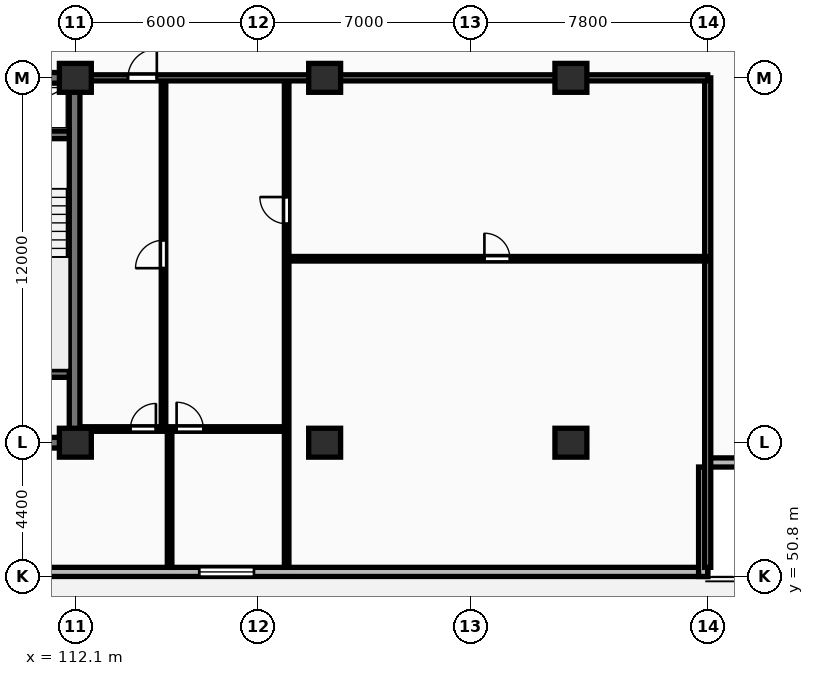
"""IFC4 building model, lengths in metres.
Left out: names, types, materials, properties, quantities, classifications, styles, units other than length and angle.
Written with IfcOpenShell. Run it as: python <this file> out.ifc"""

import sys

from ifc_helpers import new_model, si_unit, direction, frame, frame_2d, origin, origin_2d, place, context, subcontext, project, spatial, rectangle, extrude, element, fill, save


model = new_model("IFC4")
c1 = context("Model", 3, precision=1e-05, world=origin(), true_north=direction((0.0, 1.0)))
c2 = subcontext(c1, "Body", "Model", "MODEL_VIEW")
j1 = project(units=[si_unit("LENGTHUNIT", "METRE"), si_unit("PLANEANGLEUNIT", "RADIAN")], contexts=[c1])
p1 = place(None, origin())
s1 = spatial("IfcSite", under=j1, at=p1, CompositionType="ELEMENT")
p2 = place(p1, origin())
s2 = spatial("IfcBuilding", under=s1, at=p2, CompositionType="ELEMENT")
p3 = place(p2, frame((0.0, 0.0, 24.0)))
s3 = spatial("IfcBuildingStorey", under=s2, at=p3, CompositionType="ELEMENT", Elevation=24.0)
for number, where, z_axis, x_axis in (
    (1, (112.1, 55.2, 0.0), (0.0, 0.0, 1.0), (1.0, 0.0, 0.0)),
    (2, (112.1, 67.2, 0.0), (0.0, 0.0, 1.0), (1.0, 0.0, 0.0)),
    (3, (120.3, 55.2, 0.0), (0.0, 0.0, 1.0), (1.0, 0.0, 0.0)),
    (4, (120.3, 67.2, 0.0), (0.0, 0.0, 1.0), (1.0, 0.0, 0.0)),
    (5, (128.4, 55.2, 0.0), (0.0, 0.0, 1.0), (1.0, 0.0, 0.0)),
    (6, (128.4, 67.2, 0.0), (0.0, 0.0, 1.0), (1.0, 0.0, 0.0)),
):
    element("IfcColumn", number, at=place(p3, frame(where, z_axis=z_axis, x_axis=x_axis)), inside=s3, PredefinedType="COLUMN", context=c2, shape_type="SweptSolid", body=[
        extrude(rectangle(XDim=1.05, YDim=0.95, at=origin_2d()), origin(), (0.0, 0.0, 1.0), 3.25),
    ])
p4 = place(p3, frame((55.3, 50.95, 0.0), z_axis=(0.0, 0.0, 1.0), x_axis=(1.0, 0.0, 0.0)))
e7 = element("IfcWall", 7, at=p4, inside=s3, PredefinedType="STANDARD", context=c2, shape_type="SweptSolid", body=[
    extrude(rectangle(XDim=77.6, YDim=0.3, at=frame_2d((38.8, 0.0))), origin(), (0.0, 0.0, 1.0), 2.97),
])
p5 = place(p4, frame((17.525, 0.0, 0.85)))
e8 = element("IfcOpeningElement", 8, at=p5, cuts=e7, PredefinedType="OPENING", context=c2, shape_type="SweptSolid", body=[
    extrude(rectangle(XDim=1.8, YDim=1.8, at=frame_2d((0.9, 0.9))), frame((0.0, 0.16, 0.0), z_axis=(0.0, -1.0, 0.0), x_axis=(1.0, 0.0, 0.0)), (0.0, 0.0, 1.0), 0.32),
])
p6 = place(p4, frame((60.875, 0.0, 0.85)))
e9 = element("IfcOpeningElement", 9, at=p6, cuts=e7, PredefinedType="OPENING", context=c2, shape_type="SweptSolid", body=[
    extrude(rectangle(XDim=1.8, YDim=1.8, at=frame_2d((0.9, 0.9))), frame((0.0, 0.16, 0.0), z_axis=(0.0, -1.0, 0.0), x_axis=(1.0, 0.0, 0.0)), (0.0, 0.0, 1.0), 0.32),
])
p7 = place(p4, frame((9.9, 0.0, 0.0)))
e10 = element("IfcOpeningElement", 10, at=p7, cuts=e7, PredefinedType="OPENING", context=c2, shape_type="SweptSolid", body=[
    extrude(rectangle(XDim=1.6, YDim=2.2, at=frame_2d((0.8, 1.1))), frame((0.0, 0.16, 0.0), z_axis=(0.0, -1.0, 0.0), x_axis=(1.0, 0.0, 0.0)), (0.0, 0.0, 1.0), 0.32),
])
p8 = place(p3, frame((132.75, 50.8, 0.0), z_axis=(0.0, 0.0, 1.0), x_axis=(0.0, 1.0, 0.0)))
e11 = element("IfcWall", 11, at=p8, inside=s3, PredefinedType="STANDARD", context=c2, shape_type="SweptSolid", body=[
    extrude(rectangle(XDim=3.6, YDim=0.3, at=frame_2d((1.8, 0.0))), origin(), (0.0, 0.0, 1.0), 2.97),
])
p9 = place(p3, frame((132.9, 54.55, 0.0), z_axis=(0.0, 0.0, 1.0), x_axis=(1.0, 0.0, 0.0)))
e12 = element("IfcWall", 12, at=p9, inside=s3, PredefinedType="STANDARD", context=c2, shape_type="SweptSolid", body=[
    extrude(rectangle(XDim=3.6, YDim=0.3, at=frame_2d((1.8, 0.0))), origin(), (0.0, 0.0, 1.0), 2.97),
])
p10 = place(p3, frame((75.95, 55.2, 0.0), z_axis=(0.0, 0.0, 1.0), x_axis=(1.0, 0.0, 0.0)))
e13 = element("IfcWall", 13, at=p10, inside=s3, PredefinedType="SHEAR", context=c2, shape_type="SweptSolid", body=[
    extrude(rectangle(XDim=36.3, YDim=0.35, at=frame_2d((18.15, 0.0))), origin(), (0.0, 0.0, 1.0), 3.25),
])
p11 = place(p3, frame((112.075, 55.375, 0.0), z_axis=(0.0, 0.0, 1.0), x_axis=(0.0, 1.0, 0.0)))
e14 = element("IfcWall", 14, at=p11, inside=s3, PredefinedType="SHEAR", context=c2, shape_type="SweptSolid", body=[
    extrude(rectangle(XDim=11.65, YDim=0.35, at=frame_2d((5.825, 0.0))), origin(), (0.0, 0.0, 1.0), 3.25),
])
p12 = place(p3, frame((75.95, 67.2, 0.0), z_axis=(0.0, 0.0, 1.0), x_axis=(1.0, 0.0, 0.0)))
e15 = element("IfcWall", 15, at=p12, inside=s3, PredefinedType="SHEAR", context=c2, shape_type="SweptSolid", body=[
    extrude(rectangle(XDim=36.3, YDim=0.35, at=frame_2d((18.15, 0.0))), origin(), (0.0, 0.0, 1.0), 3.25),
])
p13 = place(p12, frame((5.25, 0.0, 0.0)))
e16 = element("IfcOpeningElement", 16, at=p13, cuts=e15, PredefinedType="OPENING", context=c2, shape_type="SweptSolid", body=[
    extrude(rectangle(XDim=1.0, YDim=2.15, at=frame_2d((0.5, 1.075))), frame((0.0, 0.185, 0.0), z_axis=(0.0, -1.0, 0.0), x_axis=(1.0, 0.0, 0.0)), (0.0, 0.0, 1.0), 0.37),
])
p14 = place(p12, frame((21.6, 0.0, 0.0)))
e17 = element("IfcOpeningElement", 17, at=p14, cuts=e15, PredefinedType="OPENING", context=c2, shape_type="SweptSolid", body=[
    extrude(rectangle(XDim=1.5, YDim=2.2, at=frame_2d((0.75, 1.1))), frame((0.0, 0.185, 0.0), z_axis=(0.0, -1.0, 0.0), x_axis=(1.0, 0.0, 0.0)), (0.0, 0.0, 1.0), 0.37),
])
p15 = place(p12, frame((30.45, 0.0, 0.0)))
e18 = element("IfcOpeningElement", 18, at=p15, cuts=e15, PredefinedType="OPENING", context=c2, shape_type="SweptSolid", body=[
    extrude(rectangle(XDim=1.0, YDim=2.15, at=frame_2d((0.5, 1.075))), frame((0.0, 0.185, 0.0), z_axis=(0.0, -1.0, 0.0), x_axis=(1.0, 0.0, 0.0)), (0.0, 0.0, 1.0), 0.37),
])
for number, where, z_axis, x_axis in (
    (19, (108.66, 57.475, 0.0), (0.0, 0.0, 1.0), (1.0, 0.0, 0.0)),
    (20, (108.66, 65.325, 0.0), (0.0, 0.0, 1.0), (1.0, 0.0, 0.0)),
):
    element("IfcWall", number, at=place(p3, frame(where, z_axis=z_axis, x_axis=x_axis)), inside=s3, PredefinedType="SHEAR", context=c2, shape_type="SweptSolid", body=[
        extrude(rectangle(XDim=3.24, YDim=0.25, at=frame_2d((1.62, 0.0))), origin(), (0.0, 0.0, 1.0), 3.25),
    ])
p16 = place(p3, frame((132.9, 51.1, 0.0), z_axis=(0.0, 0.0, 1.0), x_axis=(0.0, 1.0, 0.0)))
e21 = element("IfcWall", 21, at=p16, inside=s3, PredefinedType="PARTITIONING", context=c2, shape_type="SweptSolid", body=[
    extrude(rectangle(XDim=16.1, YDim=0.2, at=frame_2d((8.05, 0.0))), origin(), (0.0, 0.0, 1.0), 2.97),
])
p17 = place(p3, frame((119.05, 61.25, 0.0), z_axis=(0.0, 0.0, 1.0), x_axis=(1.0, 0.0, 0.0)))
e22 = element("IfcWall", 22, at=p17, inside=s3, PredefinedType="PARTITIONING", context=c2, shape_type="SweptSolid", body=[
    extrude(rectangle(XDim=13.85, YDim=0.15, at=frame_2d((6.925, 0.0))), origin(), (0.0, 0.0, 1.0), 2.97),
])
p18 = place(p17, frame((6.505, 0.0, 0.0)))
e23 = element("IfcOpeningElement", 23, at=p18, cuts=e22, PredefinedType="OPENING", context=c2, shape_type="SweptSolid", body=[
    extrude(rectangle(XDim=0.84, YDim=2.04, at=frame_2d((0.42, 1.02))), frame((0.0, 0.085, 0.0), z_axis=(0.0, -1.0, 0.0), x_axis=(1.0, 0.0, 0.0)), (0.0, 0.0, 1.0), 0.17),
])
p19 = place(p3, frame((119.05, 51.1, 0.0), z_axis=(0.0, 0.0, 1.0), x_axis=(0.0, 1.0, 0.0)))
e24 = element("IfcWall", 24, at=p19, inside=s3, PredefinedType="PARTITIONING", context=c2, shape_type="SweptSolid", body=[
    extrude(rectangle(XDim=16.05, YDim=0.15, at=frame_2d((8.025, 0.0))), origin(), (0.0, 0.0, 1.0), 2.97),
])
p20 = place(p19, frame((11.3, 0.0, 0.0)))
e25 = element("IfcOpeningElement", 25, at=p20, cuts=e24, PredefinedType="OPENING", context=c2, shape_type="SweptSolid", body=[
    extrude(rectangle(XDim=0.88, YDim=2.06, at=frame_2d((0.44, 1.03))), frame((0.0, 0.085, 0.0), z_axis=(0.0, -1.0, 0.0), x_axis=(1.0, 0.0, 0.0)), (0.0, 0.0, 1.0), 0.17),
])
p21 = place(p3, frame((115.0, 55.65, 0.0), z_axis=(0.0, 0.0, 1.0), x_axis=(0.0, 1.0, 0.0)))
e26 = element("IfcWall", 26, at=p21, inside=s3, PredefinedType="PARTITIONING", context=c2, shape_type="SweptSolid", body=[
    extrude(rectangle(XDim=11.5, YDim=0.15, at=frame_2d((5.75, 0.0))), origin(), (0.0, 0.0, 1.0), 2.97),
])
p22 = place(p21, frame((5.29, 0.0, 0.0)))
e27 = element("IfcOpeningElement", 27, at=p22, cuts=e26, PredefinedType="OPENING", context=c2, shape_type="SweptSolid", body=[
    extrude(rectangle(XDim=0.92, YDim=2.08, at=frame_2d((0.46, 1.04))), frame((0.0, 0.085, 0.0), z_axis=(0.0, -1.0, 0.0), x_axis=(1.0, 0.0, 0.0)), (0.0, 0.0, 1.0), 0.17),
])
p23 = place(p3, frame((115.2, 51.1, 0.0), z_axis=(0.0, 0.0, 1.0), x_axis=(0.0, 1.0, 0.0)))
e28 = element("IfcWall", 28, at=p23, inside=s3, PredefinedType="PARTITIONING", context=c2, shape_type="SweptSolid", body=[
    extrude(rectangle(XDim=4.55, YDim=0.15, at=frame_2d((2.275, 0.0))), origin(), (0.0, 0.0, 1.0), 2.97),
])
p24 = place(p3, frame((112.27, 55.65, 0.0), z_axis=(0.0, 0.0, 1.0), x_axis=(1.0, 0.0, 0.0)))
e29 = element("IfcWall", 29, at=p24, inside=s3, PredefinedType="PARTITIONING", context=c2, shape_type="SweptSolid", body=[
    extrude(rectangle(XDim=6.76, YDim=0.15, at=frame_2d((3.38, 0.0))), origin(), (0.0, 0.0, 1.0), 2.97),
])
p25 = place(p24, frame((1.64, 0.0, 0.0)))
e30 = element("IfcOpeningElement", 30, at=p25, cuts=e29, PredefinedType="OPENING", context=c2, shape_type="SweptSolid", body=[
    extrude(rectangle(XDim=0.84, YDim=2.04, at=frame_2d((0.42, 1.02))), frame((0.0, 0.085, 0.0), z_axis=(0.0, -1.0, 0.0), x_axis=(1.0, 0.0, 0.0)), (0.0, 0.0, 1.0), 0.17),
])
p26 = place(p24, frame((3.16, 0.0, 0.0)))
e31 = element("IfcOpeningElement", 31, at=p26, cuts=e29, PredefinedType="OPENING", context=c2, shape_type="SweptSolid", body=[
    extrude(rectangle(XDim=0.88, YDim=2.06, at=frame_2d((0.44, 1.03))), frame((0.0, 0.085, 0.0), z_axis=(0.0, -1.0, 0.0), x_axis=(1.0, 0.0, 0.0)), (0.0, 0.0, 1.0), 0.17),
])
p27 = place(p3, frame((112.25, 67.2, 0.0), z_axis=(0.0, 0.0, 1.0), x_axis=(1.0, 0.0, 0.0)))
e32 = element("IfcWall", 32, at=p27, inside=s3, PredefinedType="PARTITIONING", context=c2, shape_type="SweptSolid", body=[
    extrude(rectangle(XDim=20.65, YDim=0.2, at=frame_2d((10.325, 0.0))), origin(), (0.0, 0.0, 1.0), 2.37),
])
p28 = place(p27, frame((1.58, 0.0, 0.0)))
e33 = element("IfcOpeningElement", 33, at=p28, cuts=e32, PredefinedType="OPENING", context=c2, shape_type="SweptSolid", body=[
    extrude(rectangle(XDim=0.95, YDim=2.15, at=frame_2d((0.475, 1.075))), frame((0.0, 0.11, 0.0), z_axis=(0.0, -1.0, 0.0), x_axis=(1.0, 0.0, 0.0)), (0.0, 0.0, 1.0), 0.22),
])
p29 = place(p6, origin())
e34 = element("IfcWindow", 34, at=p29, inside=s3, PartitioningType="SINGLE_PANEL", PredefinedType="WINDOW", context=c2, shape_type="SweptSolid", body=[
    extrude(rectangle(XDim=1.8, YDim=1.8, at=frame_2d((0.9, 0.9))), frame((0.0, 0.03, 0.0), z_axis=(0.0, -1.0, 0.0), x_axis=(1.0, 0.0, 0.0)), (0.0, 0.0, 1.0), 0.06),
])
fill(e9, e34)
p30 = place(p18, origin())
e35 = element("IfcDoor", 35, at=p30, inside=s3, OperationType="SINGLE_SWING_LEFT", PredefinedType="DOOR", context=c2, shape_type="SweptSolid", body=[
    extrude(rectangle(XDim=0.84, YDim=2.04, at=frame_2d((0.42, 1.02))), frame((0.0, 0.025, 0.0), z_axis=(0.0, -1.0, 0.0), x_axis=(1.0, 0.0, 0.0)), (0.0, 0.0, 1.0), 0.05),
])
fill(e23, e35)
p31 = place(p20, origin())
e36 = element("IfcDoor", 36, at=p31, inside=s3, OperationType="SINGLE_SWING_RIGHT", PredefinedType="DOOR", context=c2, shape_type="SweptSolid", body=[
    extrude(rectangle(XDim=0.88, YDim=2.06, at=frame_2d((0.44, 1.03))), frame((0.0, 0.025, 0.0), z_axis=(0.0, -1.0, 0.0), x_axis=(1.0, 0.0, 0.0)), (0.0, 0.0, 1.0), 0.05),
])
fill(e25, e36)
p32 = place(p22, origin())
e37 = element("IfcDoor", 37, at=p32, inside=s3, OperationType="SINGLE_SWING_LEFT", PredefinedType="DOOR", context=c2, shape_type="SweptSolid", body=[
    extrude(rectangle(XDim=0.92, YDim=2.08, at=frame_2d((0.46, 1.04))), frame((0.0, 0.025, 0.0), z_axis=(0.0, -1.0, 0.0), x_axis=(1.0, 0.0, 0.0)), (0.0, 0.0, 1.0), 0.05),
])
fill(e27, e37)
p33 = place(p25, origin())
e38 = element("IfcDoor", 38, at=p33, inside=s3, OperationType="SINGLE_SWING_RIGHT", PredefinedType="DOOR", context=c2, shape_type="SweptSolid", body=[
    extrude(rectangle(XDim=0.84, YDim=2.04, at=frame_2d((0.42, 1.02))), frame((0.0, 0.025, 0.0), z_axis=(0.0, -1.0, 0.0), x_axis=(1.0, 0.0, 0.0)), (0.0, 0.0, 1.0), 0.05),
])
fill(e30, e38)
p34 = place(p26, origin())
e39 = element("IfcDoor", 39, at=p34, inside=s3, OperationType="SINGLE_SWING_LEFT", PredefinedType="DOOR", context=c2, shape_type="SweptSolid", body=[
    extrude(rectangle(XDim=0.88, YDim=2.06, at=frame_2d((0.44, 1.03))), frame((0.0, 0.025, 0.0), z_axis=(0.0, -1.0, 0.0), x_axis=(1.0, 0.0, 0.0)), (0.0, 0.0, 1.0), 0.05),
])
fill(e31, e39)
p35 = place(p28, origin())
e40 = element("IfcDoor", 40, at=p35, inside=s3, OperationType="SINGLE_SWING_RIGHT", PredefinedType="DOOR", context=c2, shape_type="SweptSolid", body=[
    extrude(rectangle(XDim=0.95, YDim=2.15, at=frame_2d((0.475, 1.075))), frame((0.0, 0.025, 0.0), z_axis=(0.0, -1.0, 0.0), x_axis=(1.0, 0.0, 0.0)), (0.0, 0.0, 1.0), 0.05),
])
fill(e33, e40)
save(model, sys.argv[1])
